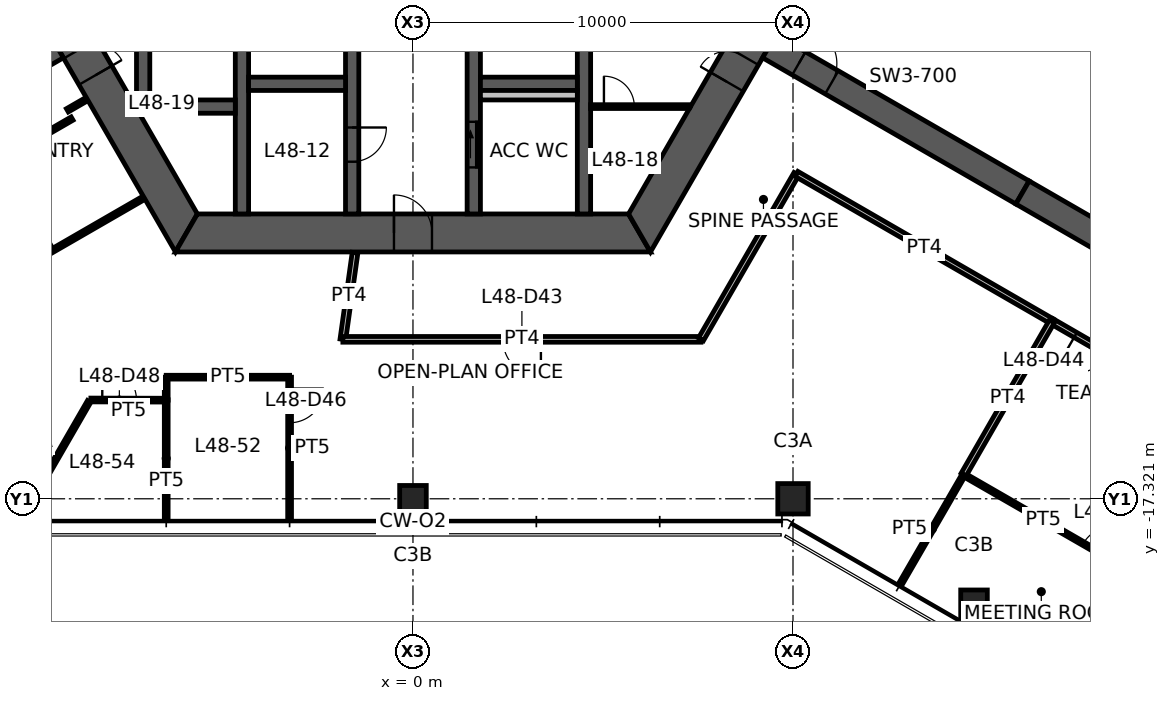
"""IFC4 building model, lengths in metres.
Left out: names, types, materials, properties, quantities, classifications, styles, units other than length and angle.
Written with IfcOpenShell. Run it as: python <this file> out.ifc"""

import sys

from ifc_helpers import new_model, si_unit, direction, frame, frame_2d, origin, origin_2d, place, context, subcontext, project, spatial, polyline, rectangle, hollow_rectangle, outline, extrude, element, fill, save


model = new_model("IFC4")
c1 = context("Model", 3, precision=1e-05, world=origin(), true_north=direction((0.0, 1.0)))
c2 = subcontext(c1, "Body", "Model", "MODEL_VIEW")
j1 = project(units=[si_unit("LENGTHUNIT", "METRE"), si_unit("PLANEANGLEUNIT", "RADIAN")], contexts=[c1])
p1 = place(None, origin())
s1 = spatial("IfcSite", under=j1, at=p1, CompositionType="ELEMENT")
p2 = place(p1, origin())
s2 = spatial("IfcBuilding", under=s1, at=p2, CompositionType="ELEMENT")
p3 = place(p2, frame((0.0, 0.0, 191.6)))
s3 = spatial("IfcBuildingStorey", under=s2, at=p3, CompositionType="ELEMENT", Elevation=191.6)
p4 = place(p3, frame((10.0, -17.321, 0.0), z_axis=(0.0, 0.0, 1.0), x_axis=(1.0, 0.0, 0.0)))
e1 = element("IfcColumn", 1, at=p4, inside=s3, PredefinedType="COLUMN", context=c2, shape_type="SweptSolid", body=[
    extrude(hollow_rectangle(XDim=0.8, YDim=0.8, WallThickness=0.045, at=origin_2d()), origin(), (0.0, 0.0, 1.0), 3.9),
])
for number, where, z_axis, x_axis in (
    (2, (0.0, -17.321, 0.0), (0.0, 0.0, 1.0), (1.0, 0.0, 0.0)),
    (3, (14.763, -20.071, 0.0), (0.0, 0.0, 1.0), (1.0, 0.0, 0.0)),
):
    element("IfcColumn", number, at=place(p3, frame(where, z_axis=z_axis, x_axis=x_axis)), inside=s3, PredefinedType="COLUMN", context=c2, shape_type="SweptSolid", body=[
        extrude(hollow_rectangle(XDim=0.7, YDim=0.7, WallThickness=0.036, at=origin_2d()), origin(), (0.0, 0.0, 1.0), 3.9),
    ])
p5 = place(p3, frame((-11.922, 0.0, 0.0), z_axis=(0.0, 0.0, 1.0), x_axis=(0.500004296715, -0.866022923061, 0.0)))
e4 = element("IfcWall", 4, at=p5, inside=s3, PredefinedType="SHEAR", context=c2, shape_type="SweptSolid", body=[
    extrude(outline(polyline([(-0.289, -0.5), (6.331, -0.5), (7.131, -0.5), (12.211, -0.5), (11.634, 0.5), (7.131, 0.5), (6.331, 0.5), (0.289, 0.5), (-0.289, -0.5)])), origin(), (0.0, 0.0, 1.0), 3.9),
])
p6 = place(p5, frame((6.331, 0.0, 0.0)))
e5 = element("IfcOpeningElement", 5, at=p6, cuts=e4, PredefinedType="OPENING", context=c2, shape_type="SweptSolid", body=[
    extrude(rectangle(XDim=0.8, YDim=2.1, at=frame_2d((0.4, 1.05))), frame((0.0, 0.51, 0.0), z_axis=(0.0, -1.0, 0.0), x_axis=(1.0, 0.0, 0.0)), (0.0, 0.0, 1.0), 1.02),
])
p7 = place(p3, frame((-5.961, -10.325, 0.0), z_axis=(0.0, 0.0, 1.0), x_axis=(1.0, 0.0, 0.0)))
e6 = element("IfcWall", 6, at=p7, inside=s3, PredefinedType="SHEAR", context=c2, shape_type="SweptSolid", body=[
    extrude(outline(polyline([(-0.289, -0.5), (5.461, -0.5), (6.461, -0.5), (12.211, -0.5), (11.634, 0.5), (6.461, 0.5), (5.461, 0.5), (0.289, 0.5), (-0.289, -0.5)])), origin(), (0.0, 0.0, 1.0), 3.9),
])
p8 = place(p7, frame((5.461, 0.0, 0.0)))
e7 = element("IfcOpeningElement", 7, at=p8, cuts=e6, PredefinedType="OPENING", context=c2, shape_type="SweptSolid", body=[
    extrude(rectangle(XDim=1.0, YDim=2.1, at=frame_2d((0.5, 1.05))), frame((0.0, 0.51, 0.0), z_axis=(0.0, -1.0, 0.0), x_axis=(1.0, 0.0, 0.0)), (0.0, 0.0, 1.0), 1.02),
])
p9 = place(p3, frame((5.961, -10.325, 0.0), z_axis=(0.0, 0.0, 1.0), x_axis=(0.500004296715, 0.866022923061, 0.0)))
e8 = element("IfcWall", 8, at=p9, inside=s3, PredefinedType="SHEAR", context=c2, shape_type="SweptSolid", body=[
    extrude(outline(polyline([(-0.289, -0.5), (4.594, -0.5), (5.394, -0.5), (12.211, -0.5), (11.634, 0.5), (5.394, 0.5), (4.594, 0.5), (0.289, 0.5), (-0.289, -0.5)])), origin(), (0.0, 0.0, 1.0), 3.9),
])
p10 = place(p9, frame((4.594, 0.0, 0.0)))
e9 = element("IfcOpeningElement", 9, at=p10, cuts=e8, PredefinedType="OPENING", context=c2, shape_type="SweptSolid", body=[
    extrude(rectangle(XDim=0.8, YDim=2.1, at=frame_2d((0.4, 1.05))), frame((0.0, 0.51, 0.0), z_axis=(0.0, -1.0, 0.0), x_axis=(1.0, 0.0, 0.0)), (0.0, 0.0, 1.0), 1.02),
])
p11 = place(p3, frame((-9.375, -5.413, 0.0), z_axis=(0.0, 0.0, 1.0), x_axis=(-0.866032377459, -0.499987921047, 0.0)))
e10 = element("IfcWall", 10, at=p11, inside=s3, PredefinedType="SHEAR", context=c2, shape_type="SweptSolid", body=[
    extrude(rectangle(XDim=7.696, YDim=0.7, at=frame_2d((3.848, 0.0))), origin(), (0.0, 0.0, 1.0), 3.9),
])
p12 = place(p11, frame((0.9, 0.0, 0.0)))
e11 = element("IfcOpeningElement", 11, at=p12, cuts=e10, PredefinedType="OPENING", context=c2, shape_type="SweptSolid", body=[
    extrude(rectangle(XDim=1.0, YDim=2.1, at=frame_2d((0.5, 1.05))), frame((0.0, 0.36, 0.0), z_axis=(0.0, -1.0, 0.0), x_axis=(1.0, 0.0, 0.0)), (0.0, 0.0, 1.0), 0.72),
])
p13 = place(p3, frame((9.375, -5.413, 0.0), z_axis=(0.0, 0.0, 1.0), x_axis=(0.866032377459, -0.499987921047, 0.0)))
e12 = element("IfcWall", 12, at=p13, inside=s3, PredefinedType="SHEAR", context=c2, shape_type="SweptSolid", body=[
    extrude(rectangle(XDim=7.696, YDim=0.7, at=frame_2d((3.848, 0.0))), origin(), (0.0, 0.0, 1.0), 3.9),
])
p14 = place(p13, frame((0.9, 0.0, 0.0)))
e13 = element("IfcOpeningElement", 13, at=p14, cuts=e12, PredefinedType="OPENING", context=c2, shape_type="SweptSolid", body=[
    extrude(rectangle(XDim=1.0, YDim=2.1, at=frame_2d((0.5, 1.05))), frame((0.0, 0.36, 0.0), z_axis=(0.0, -1.0, 0.0), x_axis=(1.0, 0.0, 0.0)), (0.0, 0.0, 1.0), 0.72),
])
p15 = place(p3, frame((16.039, -9.26, 0.0), z_axis=(0.0, 0.0, 1.0), x_axis=(0.866024837091, -0.50000098154, 0.0)))
e14 = element("IfcWall", 14, at=p15, inside=s3, PredefinedType="SHEAR", context=c2, shape_type="SweptSolid", body=[
    extrude(rectangle(XDim=13.0, YDim=0.7, at=frame_2d((6.5, 0.0))), origin(), (0.0, 0.0, 1.0), 3.9),
])
p16 = place(p3, frame((-1.6, -3.775, 0.0), z_axis=(0.0, 0.0, 1.0), x_axis=(0.0, -1.0, 0.0)))
e15 = element("IfcWall", 15, at=p16, inside=s3, PredefinedType="SHEAR", context=c2, shape_type="SweptSolid", body=[
    extrude(rectangle(XDim=6.05, YDim=0.35, at=frame_2d((3.025, 0.0))), origin(), (0.0, 0.0, 1.0), 3.9),
])
p17 = place(p16, frame((3.775, 0.0, 0.0)))
e16 = element("IfcOpeningElement", 16, at=p17, cuts=e15, PredefinedType="OPENING", context=c2, shape_type="SweptSolid", body=[
    extrude(rectangle(XDim=0.9, YDim=2.1, at=frame_2d((0.45, 1.05))), frame((0.0, 0.185, 0.0), z_axis=(0.0, -1.0, 0.0), x_axis=(1.0, 0.0, 0.0)), (0.0, 0.0, 1.0), 0.37),
])
p18 = place(p3, frame((1.6, -3.775, 0.0), z_axis=(0.0, 0.0, 1.0), x_axis=(0.0, -1.0, 0.0)))
e17 = element("IfcWall", 17, at=p18, inside=s3, PredefinedType="SHEAR", context=c2, shape_type="SweptSolid", body=[
    extrude(rectangle(XDim=6.05, YDim=0.35, at=frame_2d((3.025, 0.0))), origin(), (0.0, 0.0, 1.0), 3.9),
])
p19 = place(p18, frame((3.625, 0.0, 0.0)))
e18 = element("IfcOpeningElement", 18, at=p19, cuts=e17, PredefinedType="OPENING", context=c2, shape_type="SweptSolid", body=[
    extrude(rectangle(XDim=1.2, YDim=2.1, at=frame_2d((0.6, 1.05))), frame((0.0, 0.185, 0.0), z_axis=(0.0, -1.0, 0.0), x_axis=(1.0, 0.0, 0.0)), (0.0, 0.0, 1.0), 0.37),
])
for number, where, z_axis, x_axis in (
    (19, (-4.5, -3.775, 0.0), (0.0, 0.0, 1.0), (0.0, -1.0, 0.0)),
    (20, (4.5, -3.775, 0.0), (0.0, 0.0, 1.0), (0.0, -1.0, 0.0)),
):
    element("IfcWall", number, at=place(p3, frame(where, z_axis=z_axis, x_axis=x_axis)), inside=s3, PredefinedType="SHEAR", context=c2, shape_type="SweptSolid", body=[
        extrude(rectangle(XDim=6.05, YDim=0.35, at=frame_2d((3.025, 0.0))), origin(), (0.0, 0.0, 1.0), 3.9),
    ])
for number, where, z_axis, x_axis in (
    (21, (-4.325, -6.4, 0.0), (0.0, 0.0, 1.0), (1.0, 0.0, 0.0)),
    (22, (1.775, -6.4, 0.0), (0.0, 0.0, 1.0), (1.0, 0.0, 0.0)),
):
    element("IfcWall", number, at=place(p3, frame(where, z_axis=z_axis, x_axis=x_axis)), inside=s3, PredefinedType="SHEAR", context=c2, shape_type="SweptSolid", body=[
        extrude(rectangle(XDim=2.55, YDim=0.35, at=frame_2d((1.275, 0.0))), origin(), (0.0, 0.0, 1.0), 3.9),
    ])
p20 = place(p3, frame((-6.925, -7.0, 0.0), z_axis=(0.0, 0.0, 1.0), x_axis=(1.0, 0.0, 0.0)))
e23 = element("IfcWall", 23, at=p20, inside=s3, PredefinedType="SHEAR", context=c2, shape_type="SweptSolid", body=[
    extrude(rectangle(XDim=2.25, YDim=0.35, at=frame_2d((1.125, 0.0))), origin(), (0.0, 0.0, 1.0), 3.9),
])
p21 = place(p3, frame((-7.1, -3.775, 0.0), z_axis=(0.0, 0.0, 1.0), x_axis=(0.0, -1.0, 0.0)))
e24 = element("IfcWall", 24, at=p21, inside=s3, PredefinedType="SHEAR", context=c2, shape_type="SweptSolid", body=[
    extrude(outline(polyline([(0.0, -0.175), (3.274, -0.175), (3.4, 0.0), (3.4, 0.175), (0.0, 0.175), (0.0, -0.175)])), origin(), (0.0, 0.0, 1.0), 3.9),
])
p22 = place(p3, frame((1.775, -6.7, 0.0), z_axis=(0.0, 0.0, 1.0), x_axis=(1.0, 0.0, 0.0)))
e25 = element("IfcWall", 25, at=p22, inside=s3, PredefinedType="PLUMBINGWALL", context=c2, shape_type="SweptSolid", body=[
    extrude(rectangle(XDim=2.55, YDim=0.25, at=frame_2d((1.275, 0.0))), origin(), (0.0, 0.0, 1.0), 3.9),
])
p23 = place(p3, frame((4.675, -7.0, 0.0), z_axis=(0.0, 0.0, 1.0), x_axis=(1.0, 0.0, 0.0)))
e26 = element("IfcWall", 26, at=p23, inside=s3, PredefinedType="PARTITIONING", context=c2, shape_type="SweptSolid", body=[
    extrude(outline(polyline([(0.0, -0.05), (0.35, -0.05), (1.15, -0.05), (2.6, -0.05), (2.628, 0.0), (2.634, 0.05), (1.15, 0.05), (0.35, 0.05), (0.0, 0.05), (0.0, -0.05)])), origin(), (0.0, 0.0, 1.0), 2.95),
])
p24 = place(p23, frame((0.35, 0.0, 0.0)))
e27 = element("IfcOpeningElement", 27, at=p24, cuts=e26, PredefinedType="OPENING", context=c2, shape_type="SweptSolid", body=[
    extrude(rectangle(XDim=0.8, YDim=2.1, at=frame_2d((0.4, 1.05))), frame((0.0, 0.06, 0.0), z_axis=(0.0, -1.0, 0.0), x_axis=(1.0, 0.0, 0.0)), (0.0, 0.0, 1.0), 0.12),
])
p25 = place(p3, frame((-10.355, -8.115, 0.0), z_axis=(0.0, 0.0, 1.0), x_axis=(0.866094119867, 0.499880961361, 0.0)))
e28 = element("IfcWall", 28, at=p25, inside=s3, PredefinedType="PARTITIONING", context=c2, shape_type="SweptSolid", body=[
    extrude(rectangle(XDim=1.6, YDim=0.1, at=frame_2d((0.8, 0.0))), origin(), (0.0, 0.0, 1.0), 2.95),
])
p26 = place(p3, frame((-9.5, -10.796, 0.0), z_axis=(0.0, 0.0, 1.0), x_axis=(-0.499990139034, 0.866031096941, 0.0)))
e29 = element("IfcWall", 29, at=p26, inside=s3, PredefinedType="PARTITIONING", context=c2, shape_type="SweptSolid", body=[
    extrude(rectangle(XDim=3.0, YDim=0.1, at=frame_2d((1.5, 0.0))), origin(), (0.0, 0.0, 1.0), 2.95),
])
p27 = place(p26, frame((1.8, 0.0, 0.0)))
e30 = element("IfcOpeningElement", 30, at=p27, cuts=e29, PredefinedType="OPENING", context=c2, shape_type="SweptSolid", body=[
    extrude(rectangle(XDim=0.9, YDim=2.1, at=frame_2d((0.45, 1.05))), frame((0.0, 0.06, 0.0), z_axis=(0.0, -1.0, 0.0), x_axis=(1.0, 0.0, 0.0)), (0.0, 0.0, 1.0), 0.12),
])
p28 = place(p3, frame((-9.094, -7.098, 0.0), z_axis=(0.0, 0.0, 1.0), x_axis=(0.865954211699, 0.50012328804, 0.0)))
e31 = element("IfcWall", 31, at=p28, inside=s3, PredefinedType="PARTITIONING", context=c2, shape_type="SweptSolid", body=[
    extrude(rectangle(XDim=0.58, YDim=0.1, at=frame_2d((0.29, 0.0))), origin(), (0.0, 0.0, 1.0), 2.95),
])
p29 = place(p3, frame((-7.092, -9.406, 0.0), z_axis=(0.0, 0.0, 1.0), x_axis=(-0.86603494908, -0.499983466698, 0.0)))
e32 = element("IfcWall", 32, at=p29, inside=s3, PredefinedType="PARTITIONING", context=c2, shape_type="SweptSolid", body=[
    extrude(rectangle(XDim=2.78, YDim=0.1, at=frame_2d((1.39, 0.0))), origin(), (0.0, 0.0, 1.0), 2.95),
])
p30 = place(p3, frame((-1.844, -13.125, 0.0), z_axis=(0.0, 0.0, 1.0), x_axis=(0.139119980631, 0.990275532864, 0.0)))
e33 = element("IfcWall", 33, at=p30, inside=s3, PredefinedType="PARTITIONING", context=c2, shape_type="SweptSolid", body=[
    extrude(rectangle(XDim=2.302, YDim=0.15, at=frame_2d((1.151, 0.0))), origin(), (0.0, 0.0, 1.0), 2.95),
])
p31 = place(p3, frame((7.578, -13.125, 0.0), z_axis=(0.0, 0.0, 1.0), x_axis=(-1.0, 0.0, 0.0)))
e34 = element("IfcWall", 34, at=p31, inside=s3, PredefinedType="PARTITIONING", context=c2, shape_type="SweptSolid", body=[
    extrude(rectangle(XDim=9.422, YDim=0.15, at=frame_2d((4.711, 0.0))), origin(), (0.0, 0.0, 1.0), 2.95),
])
p32 = place(p31, frame((4.211, 0.0, 0.0)))
e35 = element("IfcOpeningElement", 35, at=p32, cuts=e34, PredefinedType="OPENING", context=c2, shape_type="SweptSolid", body=[
    extrude(rectangle(XDim=1.0, YDim=2.1, at=frame_2d((0.5, 1.05))), frame((0.0, 0.085, 0.0), z_axis=(0.0, -1.0, 0.0), x_axis=(1.0, 0.0, 0.0)), (0.0, 0.0, 1.0), 0.17),
])
p33 = place(p3, frame((10.092, -8.771, 0.0), z_axis=(0.0, 0.0, 1.0), x_axis=(-0.500019495363, -0.866014147839, 0.0)))
e36 = element("IfcWall", 36, at=p33, inside=s3, PredefinedType="PARTITIONING", context=c2, shape_type="SweptSolid", body=[
    extrude(rectangle(XDim=5.028, YDim=0.15, at=frame_2d((2.514, 0.0))), origin(), (0.0, 0.0, 1.0), 2.95),
])
p34 = place(p3, frame((16.822, -12.656, 0.0), z_axis=(0.0, 0.0, 1.0), x_axis=(-0.866028634939, 0.499994403434, 0.0)))
e37 = element("IfcWall", 37, at=p34, inside=s3, PredefinedType="PARTITIONING", context=c2, shape_type="SweptSolid", body=[
    extrude(rectangle(XDim=7.771, YDim=0.15, at=frame_2d((3.885, 0.0))), origin(), (0.0, 0.0, 1.0), 2.95),
])
p35 = place(p3, frame((18.921, -13.869, 0.0), z_axis=(0.0, 0.0, 1.0), x_axis=(-0.866000196749, 0.500043657324, 0.0)))
e38 = element("IfcWall", 38, at=p35, inside=s3, PredefinedType="PARTITIONING", context=c2, shape_type="SweptSolid", body=[
    extrude(rectangle(XDim=2.434, YDim=0.15, at=frame_2d((1.217, 0.0))), origin(), (0.0, 0.0, 1.0), 2.95),
])
p36 = place(p35, frame((0.717, 0.0, 0.0)))
e39 = element("IfcOpeningElement", 39, at=p36, cuts=e38, PredefinedType="OPENING", context=c2, shape_type="SweptSolid", body=[
    extrude(rectangle(XDim=1.0, YDim=2.1, at=frame_2d((0.5, 1.05))), frame((0.0, 0.085, 0.0), z_axis=(0.0, -1.0, 0.0), x_axis=(1.0, 0.0, 0.0)), (0.0, 0.0, 1.0), 0.17),
])
p37 = place(p3, frame((-6.493, -17.801, 0.0), z_axis=(0.0, 0.0, 1.0), x_axis=(0.0, 1.0, 0.0)))
e40 = element("IfcWall", 40, at=p37, inside=s3, PredefinedType="PARTITIONING", context=c2, shape_type="SweptSolid", body=[
    extrude(rectangle(XDim=3.085, YDim=0.1, at=frame_2d((1.542, 0.0))), origin(), (0.0, 0.0, 1.0), 2.95),
])
p38 = place(p3, frame((-6.493, -14.725, 0.0), z_axis=(0.0, 0.0, 1.0), x_axis=(0.0, 1.0, 0.0)))
e41 = element("IfcWall", 41, at=p38, inside=s3, PredefinedType="PARTITIONING", context=c2, shape_type="SweptSolid", body=[
    extrude(rectangle(XDim=0.604, YDim=0.1, at=frame_2d((0.302, 0.0))), origin(), (0.0, 0.0, 1.0), 2.95),
])
p39 = place(p3, frame((-6.493, -14.121, 0.0), z_axis=(0.0, 0.0, 1.0), x_axis=(1.0, 0.0, 0.0)))
e42 = element("IfcWall", 42, at=p39, inside=s3, PredefinedType="PARTITIONING", context=c2, shape_type="SweptSolid", body=[
    extrude(rectangle(XDim=3.247, YDim=0.1, at=frame_2d((1.623, 0.0))), origin(), (0.0, 0.0, 1.0), 2.95),
])
p40 = place(p3, frame((-3.246, -14.121, 0.0), z_axis=(0.0, 0.0, 1.0), x_axis=(0.0, -1.0, 0.0)))
e43 = element("IfcWall", 43, at=p40, inside=s3, PredefinedType="PARTITIONING", context=c2, shape_type="SweptSolid", body=[
    extrude(rectangle(XDim=3.73, YDim=0.1, at=frame_2d((1.865, 0.0))), origin(), (0.0, 0.0, 1.0), 2.95),
])
p41 = place(p40, frame((0.3, 0.0, 0.0)))
e44 = element("IfcOpeningElement", 44, at=p41, cuts=e43, PredefinedType="OPENING", context=c2, shape_type="SweptSolid", body=[
    extrude(rectangle(XDim=0.9, YDim=2.1, at=frame_2d((0.45, 1.05))), frame((0.0, 0.06, 0.0), z_axis=(0.0, -1.0, 0.0), x_axis=(1.0, 0.0, 0.0)), (0.0, 0.0, 1.0), 0.12),
])
p42 = place(p3, frame((12.84, -19.543, 0.0), z_axis=(0.0, 0.0, 1.0), x_axis=(0.501269197563, 0.865291391136, 0.0)))
e45 = element("IfcWall", 45, at=p42, inside=s3, PredefinedType="PARTITIONING", context=c2, shape_type="SweptSolid", body=[
    extrude(rectangle(XDim=3.305, YDim=0.1, at=frame_2d((1.653, 0.0))), origin(), (0.0, 0.0, 1.0), 2.95),
])
p43 = place(p3, frame((14.49, -16.685, 0.0), z_axis=(0.0, 0.0, 1.0), x_axis=(0.866481441777, -0.499209285827, 0.0)))
e46 = element("IfcWall", 46, at=p43, inside=s3, PredefinedType="PARTITIONING", context=c2, shape_type="SweptSolid", body=[
    extrude(rectangle(XDim=4.833, YDim=0.1, at=frame_2d((2.417, 0.0))), origin(), (0.0, 0.0, 1.0), 2.95),
])
p44 = place(p43, frame((3.633, 0.0, 0.0)))
e47 = element("IfcOpeningElement", 47, at=p44, cuts=e46, PredefinedType="OPENING", context=c2, shape_type="SweptSolid", body=[
    extrude(rectangle(XDim=0.9, YDim=2.1, at=frame_2d((0.45, 1.05))), frame((0.0, 0.06, 0.0), z_axis=(0.0, -1.0, 0.0), x_axis=(1.0, 0.0, 0.0)), (0.0, 0.0, 1.0), 0.12),
])
p45 = place(p3, frame((-8.476, -14.72, 0.0), z_axis=(0.0, 0.0, 1.0), x_axis=(0.99999726379, -0.002339318888, 0.0)))
e48 = element("IfcWall", 48, at=p45, inside=s3, PredefinedType="PARTITIONING", context=c2, shape_type="SweptSolid", body=[
    extrude(rectangle(XDim=1.983, YDim=0.1, at=frame_2d((0.991, 0.0))), origin(), (0.0, 0.0, 1.0), 2.95),
])
p46 = place(p45, frame((0.3, 0.0, 0.0)))
e49 = element("IfcOpeningElement", 49, at=p46, cuts=e48, PredefinedType="OPENING", context=c2, shape_type="SweptSolid", body=[
    extrude(rectangle(XDim=0.9, YDim=2.1, at=frame_2d((0.45, 1.05))), frame((0.0, 0.06, 0.0), z_axis=(0.0, -1.0, 0.0), x_axis=(1.0, 0.0, 0.0)), (0.0, 0.0, 1.0), 0.12),
])
p47 = place(p3, frame((16.812, -12.652, 0.0), z_axis=(0.0, 0.0, 1.0), x_axis=(-0.499085020987, -0.86655302309, 0.0)))
e50 = element("IfcWall", 50, at=p47, inside=s3, PredefinedType="PARTITIONING", context=c2, shape_type="SweptSolid", body=[
    extrude(rectangle(XDim=4.654, YDim=0.15, at=frame_2d((2.327, 0.0))), origin(), (0.0, 0.0, 1.0), 2.95),
])
p48 = place(p3, frame((-9.759, -16.904, 0.0), z_axis=(0.0, 0.0, 1.0), x_axis=(0.500049399443, 0.865996881124, 0.0)))
e51 = element("IfcWall", 51, at=p48, inside=s3, PredefinedType="PARTITIONING", context=c2, shape_type="SweptSolid", body=[
    extrude(rectangle(XDim=2.478, YDim=0.1, at=frame_2d((1.239, 0.0))), origin(), (0.0, 0.0, 1.0), 2.95),
])
p49 = place(p8, origin())
e52 = element("IfcDoor", 52, at=p49, inside=s3, OperationType="SINGLE_SWING_LEFT", PredefinedType="DOOR", context=c2, shape_type="SweptSolid", body=[
    extrude(rectangle(XDim=1.0, YDim=2.1, at=frame_2d((0.5, 1.05))), frame((0.0, 0.025, 0.0), z_axis=(0.0, -1.0, 0.0), x_axis=(1.0, 0.0, 0.0)), (0.0, 0.0, 1.0), 0.05),
])
fill(e7, e52)
p50 = place(p10, origin())
e53 = element("IfcDoor", 53, at=p50, inside=s3, OperationType="SINGLE_SWING_LEFT", PredefinedType="DOOR", context=c2, shape_type="SweptSolid", body=[
    extrude(rectangle(XDim=0.8, YDim=2.1, at=frame_2d((0.4, 1.05))), frame((0.0, 0.025, 0.0), z_axis=(0.0, -1.0, 0.0), x_axis=(1.0, 0.0, 0.0)), (0.0, 0.0, 1.0), 0.05),
])
fill(e9, e53)
p51 = place(p6, origin())
e54 = element("IfcDoor", 54, at=p51, inside=s3, OperationType="SINGLE_SWING_RIGHT", PredefinedType="DOOR", context=c2, shape_type="SweptSolid", body=[
    extrude(rectangle(XDim=0.8, YDim=2.1, at=frame_2d((0.4, 1.05))), frame((0.0, 0.025, 0.0), z_axis=(0.0, -1.0, 0.0), x_axis=(1.0, 0.0, 0.0)), (0.0, 0.0, 1.0), 0.05),
])
fill(e5, e54)
p52 = place(p19, origin())
e55 = element("IfcDoor", 55, at=p52, inside=s3, OperationType="SLIDING_TO_LEFT", PredefinedType="DOOR", context=c2, shape_type="SweptSolid", body=[
    extrude(rectangle(XDim=1.2, YDim=2.1, at=frame_2d((0.6, 1.05))), frame((0.0, 0.025, 0.0), z_axis=(0.0, -1.0, 0.0), x_axis=(1.0, 0.0, 0.0)), (0.0, 0.0, 1.0), 0.05),
])
fill(e18, e55)
p53 = place(p17, origin())
e56 = element("IfcDoor", 56, at=p53, inside=s3, OperationType="SINGLE_SWING_LEFT", PredefinedType="DOOR", context=c2, shape_type="SweptSolid", body=[
    extrude(rectangle(XDim=0.9, YDim=2.1, at=frame_2d((0.45, 1.05))), frame((0.0, 0.025, 0.0), z_axis=(0.0, -1.0, 0.0), x_axis=(1.0, 0.0, 0.0)), (0.0, 0.0, 1.0), 0.05),
])
fill(e16, e56)
p54 = place(p14, origin())
e57 = element("IfcDoor", 57, at=p54, inside=s3, OperationType="SINGLE_SWING_LEFT", PredefinedType="DOOR", context=c2, shape_type="SweptSolid", body=[
    extrude(rectangle(XDim=1.0, YDim=2.1, at=frame_2d((0.5, 1.05))), frame((0.0, 0.025, 0.0), z_axis=(0.0, -1.0, 0.0), x_axis=(1.0, 0.0, 0.0)), (0.0, 0.0, 1.0), 0.05),
])
fill(e13, e57)
p55 = place(p24, origin())
e58 = element("IfcDoor", 58, at=p55, inside=s3, OperationType="SINGLE_SWING_LEFT", PredefinedType="DOOR", context=c2, shape_type="SweptSolid", body=[
    extrude(rectangle(XDim=0.8, YDim=2.1, at=frame_2d((0.4, 1.05))), frame((0.0, 0.025, 0.0), z_axis=(0.0, -1.0, 0.0), x_axis=(1.0, 0.0, 0.0)), (0.0, 0.0, 1.0), 0.05),
])
fill(e27, e58)
p56 = place(p32, origin())
e59 = element("IfcDoor", 59, at=p56, inside=s3, OperationType="SINGLE_SWING_LEFT", PredefinedType="DOOR", context=c2, shape_type="SweptSolid", body=[
    extrude(rectangle(XDim=1.0, YDim=2.1, at=frame_2d((0.5, 1.05))), frame((0.0, 0.025, 0.0), z_axis=(0.0, -1.0, 0.0), x_axis=(1.0, 0.0, 0.0)), (0.0, 0.0, 1.0), 0.05),
])
fill(e35, e59)
p57 = place(p36, origin())
e60 = element("IfcDoor", 60, at=p57, inside=s3, OperationType="SINGLE_SWING_RIGHT", PredefinedType="DOOR", context=c2, shape_type="SweptSolid", body=[
    extrude(rectangle(XDim=1.0, YDim=2.1, at=frame_2d((0.5, 1.05))), frame((0.0, 0.025, 0.0), z_axis=(0.0, -1.0, 0.0), x_axis=(1.0, 0.0, 0.0)), (0.0, 0.0, 1.0), 0.05),
])
fill(e39, e60)
p58 = place(p41, origin())
e61 = element("IfcDoor", 61, at=p58, inside=s3, OperationType="SINGLE_SWING_LEFT", PredefinedType="DOOR", context=c2, shape_type="SweptSolid", body=[
    extrude(rectangle(XDim=0.9, YDim=2.1, at=frame_2d((0.45, 1.05))), frame((0.0, 0.025, 0.0), z_axis=(0.0, -1.0, 0.0), x_axis=(1.0, 0.0, 0.0)), (0.0, 0.0, 1.0), 0.05),
])
fill(e44, e61)
p59 = place(p44, origin())
e62 = element("IfcDoor", 62, at=p59, inside=s3, OperationType="SINGLE_SWING_RIGHT", PredefinedType="DOOR", context=c2, shape_type="SweptSolid", body=[
    extrude(rectangle(XDim=0.9, YDim=2.1, at=frame_2d((0.45, 1.05))), frame((0.0, 0.025, 0.0), z_axis=(0.0, -1.0, 0.0), x_axis=(1.0, 0.0, 0.0)), (0.0, 0.0, 1.0), 0.05),
])
fill(e47, e62)
p60 = place(p46, origin())
e63 = element("IfcDoor", 63, at=p60, inside=s3, OperationType="SINGLE_SWING_LEFT", PredefinedType="DOOR", context=c2, shape_type="SweptSolid", body=[
    extrude(rectangle(XDim=0.9, YDim=2.1, at=frame_2d((0.45, 1.05))), frame((0.0, 0.025, 0.0), z_axis=(0.0, -1.0, 0.0), x_axis=(1.0, 0.0, 0.0)), (0.0, 0.0, 1.0), 0.05),
])
fill(e49, e63)
save(model, sys.argv[1])
